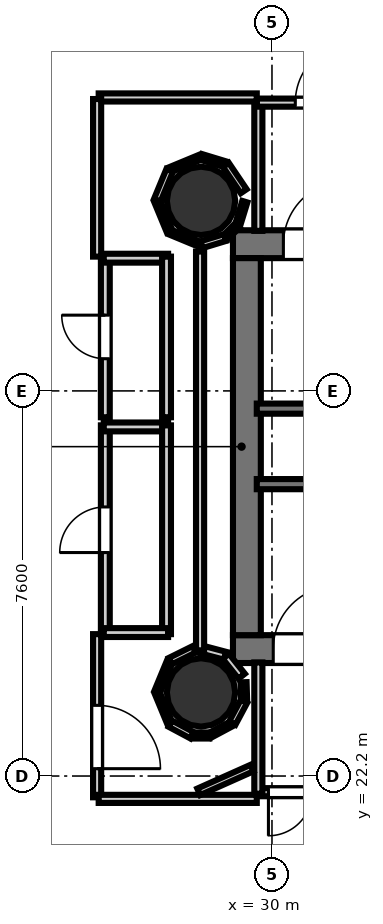
"""IFC4 building model, lengths in metres.
Left out: names, types, materials, properties, quantities, classifications, styles, units other than length and angle.
Written with IfcOpenShell. Run it as: python <this file> out.ifc"""

import sys

from ifc_helpers import new_model, si_unit, direction, frame, frame_2d, origin, origin_2d, place, context, subcontext, project, spatial, rectangle, hollow_circle, extrude, element, fill, save


model = new_model("IFC4")
c1 = context("Model", 3, precision=1e-05, world=origin(), true_north=direction((0.0, 1.0)))
c2 = subcontext(c1, "Body", "Model", "MODEL_VIEW")
j1 = project(units=[si_unit("LENGTHUNIT", "METRE"), si_unit("PLANEANGLEUNIT", "RADIAN")], contexts=[c1])
p1 = place(None, origin())
s1 = spatial("IfcSite", under=j1, at=p1, CompositionType="ELEMENT")
p2 = place(p1, origin())
s2 = spatial("IfcBuilding", under=s1, at=p2, CompositionType="ELEMENT")
p3 = place(p2, frame((0.0, 0.0, 173.5)))
s3 = spatial("IfcBuildingStorey", under=s2, at=p3, CompositionType="ELEMENT", Elevation=173.5)
p4 = place(p3, frame((29.23, 32.695, 0.0), z_axis=(0.0, 0.0, 1.0), x_axis=(1.0, 0.0, 0.0)))
e1 = element("IfcWall", 1, at=p4, inside=s3, PredefinedType="SHEAR", context=c2, shape_type="SweptSolid", body=[
    extrude(rectangle(XDim=10.62, YDim=0.55, at=frame_2d((5.31, 0.0))), origin(), (0.0, 0.0, 1.0), 3.52),
])
p5 = place(p4, frame((0.995, 0.0, 0.0)))
e2 = element("IfcOpeningElement", 2, at=p5, cuts=e1, PredefinedType="OPENING", context=c2, shape_type="SweptSolid", body=[
    extrude(rectangle(XDim=1.25, YDim=2.15, at=frame_2d((0.625, 1.075))), frame((0.0, 0.285, 0.0), z_axis=(0.0, -1.0, 0.0), x_axis=(1.0, 0.0, 0.0)), (0.0, 0.0, 1.0), 0.57),
])
p6 = place(p3, frame((29.23, 24.705, 0.0), z_axis=(0.0, 0.0, 1.0), x_axis=(1.0, 0.0, 0.0)))
e3 = element("IfcWall", 3, at=p6, inside=s3, PredefinedType="SHEAR", context=c2, shape_type="SweptSolid", body=[
    extrude(rectangle(XDim=10.62, YDim=0.55, at=frame_2d((5.31, 0.0))), origin(), (0.0, 0.0, 1.0), 3.52),
])
p7 = place(p6, frame((0.795, 0.0, 0.0)))
e4 = element("IfcOpeningElement", 4, at=p7, cuts=e3, PredefinedType="OPENING", context=c2, shape_type="SweptSolid", body=[
    extrude(rectangle(XDim=1.25, YDim=2.15, at=frame_2d((0.625, 1.075))), frame((0.0, 0.285, 0.0), z_axis=(0.0, -1.0, 0.0), x_axis=(1.0, 0.0, 0.0)), (0.0, 0.0, 1.0), 0.57),
])
p8 = place(p3, frame((29.505, 24.98, 0.0), z_axis=(0.0, 0.0, 1.0), x_axis=(0.0, 1.0, 0.0)))
e5 = element("IfcWall", 5, at=p8, inside=s3, PredefinedType="SHEAR", context=c2, shape_type="SweptSolid", body=[
    extrude(rectangle(XDim=7.44, YDim=0.55, at=frame_2d((3.72, 0.0))), origin(), (0.0, 0.0, 1.0), 3.52),
])
for number, where, z_axis, x_axis in (
    (6, (28.6, 33.55, 0.0), (0.0, 0.0, 1.0), (1.0, 0.0, 0.0)),
    (7, (28.6, 23.85, 0.0), (0.0, 0.0, 1.0), (1.0, 0.0, 0.0)),
):
    element("IfcColumn", number, at=place(p3, frame(where, z_axis=z_axis, x_axis=x_axis)), inside=s3, PredefinedType="COLUMN", context=c2, shape_type="SweptSolid", body=[
        extrude(hollow_circle(Radius=0.675, WallThickness=0.032, at=origin_2d()), origin(), (0.0, 0.0, 1.0), 3.7),
    ])
p9 = place(p3, frame((29.7, 29.45, 0.0), z_axis=(0.0, 0.0, 1.0), x_axis=(1.0, 0.0, 0.0)))
e8 = element("IfcWall", 8, at=p9, inside=s3, PredefinedType="SOLIDWALL", context=c2, shape_type="SweptSolid", body=[
    extrude(rectangle(XDim=8.3, YDim=0.2, at=frame_2d((4.15, 0.0))), origin(), (0.0, 0.0, 1.0), 3.52),
])
p10 = place(p3, frame((29.7, 27.96, 0.0), z_axis=(0.0, 0.0, 1.0), x_axis=(1.0, 0.0, 0.0)))
e9 = element("IfcWall", 9, at=p10, inside=s3, PredefinedType="SOLIDWALL", context=c2, shape_type="SweptSolid", body=[
    extrude(rectangle(XDim=7.75, YDim=0.2, at=frame_2d((3.875, 0.0))), origin(), (0.0, 0.0, 1.0), 3.52),
])
p11 = place(p3, frame((29.731, 32.958, 0.0), z_axis=(0.0, 0.0, 1.0), x_axis=(0.0, 1.0, 0.0)))
e10 = element("IfcWall", 10, at=p11, inside=s3, PredefinedType="PARTITIONING", context=c2, shape_type="SweptSolid", body=[
    extrude(rectangle(XDim=2.562, YDim=0.16, at=frame_2d((1.281, 0.0))), origin(), (0.0, 0.0, 1.0), 2.84),
])
p12 = place(p3, frame((29.7, 35.489, 0.0), z_axis=(0.0, 0.0, 1.0), x_axis=(1.0, 0.0, 0.0)))
e11 = element("IfcWall", 11, at=p12, inside=s3, PredefinedType="PARTITIONING", context=c2, shape_type="SweptSolid", body=[
    extrude(rectangle(XDim=2.72, YDim=0.16, at=frame_2d((1.36, 0.0))), origin(), (0.0, 0.0, 1.0), 2.84),
])
p13 = place(p12, frame((0.76, 0.0, 0.0)))
e12 = element("IfcOpeningElement", 12, at=p13, cuts=e11, PredefinedType="OPENING", context=c2, shape_type="SweptSolid", body=[
    extrude(rectangle(XDim=1.2, YDim=2.15, at=frame_2d((0.6, 1.075))), frame((0.0, 0.09, 0.0), z_axis=(0.0, -1.0, 0.0), x_axis=(1.0, 0.0, 0.0)), (0.0, 0.0, 1.0), 0.18),
])
p14 = place(p3, frame((33.45, 21.881, 0.0), z_axis=(0.0, 0.0, 1.0), x_axis=(-1.0, 0.0, 0.0)))
e13 = element("IfcWall", 13, at=p14, inside=s3, PredefinedType="PARTITIONING", context=c2, shape_type="SweptSolid", body=[
    extrude(rectangle(XDim=3.75, YDim=0.16, at=frame_2d((1.875, 0.0))), origin(), (0.0, 0.0, 1.0), 2.84),
])
p15 = place(p14, frame((1.275, 0.0, 0.0)))
e14 = element("IfcOpeningElement", 14, at=p15, cuts=e13, PredefinedType="OPENING", context=c2, shape_type="SweptSolid", body=[
    extrude(rectangle(XDim=1.2, YDim=2.15, at=frame_2d((0.6, 1.075))), frame((0.0, 0.09, 0.0), z_axis=(0.0, -1.0, 0.0), x_axis=(1.0, 0.0, 0.0)), (0.0, 0.0, 1.0), 0.18),
])
p16 = place(p14, frame((2.66, 0.0, 0.0)))
e15 = element("IfcOpeningElement", 15, at=p16, cuts=e13, PredefinedType="OPENING", context=c2, shape_type="SweptSolid", body=[
    extrude(rectangle(XDim=0.86, YDim=2.05, at=frame_2d((0.43, 1.025))), frame((0.0, 0.09, 0.0), z_axis=(0.0, -1.0, 0.0), x_axis=(1.0, 0.0, 0.0)), (0.0, 0.0, 1.0), 0.18),
])
p17 = place(p3, frame((29.731, 21.85, 0.0), z_axis=(0.0, 0.0, 1.0), x_axis=(0.0, 1.0, 0.0)))
e16 = element("IfcWall", 16, at=p17, inside=s3, PredefinedType="PARTITIONING", context=c2, shape_type="SweptSolid", body=[
    extrude(rectangle(XDim=2.592, YDim=0.16, at=frame_2d((1.296, 0.0))), origin(), (0.0, 0.0, 1.0), 2.84),
])
p18 = place(p3, frame((26.711, 25.0, 0.0), z_axis=(0.0, 0.0, 1.0), x_axis=(0.0, 1.0, 0.0)))
e17 = element("IfcWall", 17, at=p18, inside=s3, PredefinedType="PLUMBINGWALL", context=c2, shape_type="SweptSolid", body=[
    extrude(rectangle(XDim=4.12, YDim=0.175, at=frame_2d((2.06, 0.0))), origin(), (0.0, 0.0, 1.0), 2.84),
])
p19 = place(p18, frame((1.61, 0.0, 0.0)))
e18 = element("IfcOpeningElement", 18, at=p19, cuts=e17, PredefinedType="OPENING", context=c2, shape_type="SweptSolid", body=[
    extrude(rectangle(XDim=0.9, YDim=2.1, at=frame_2d((0.45, 1.05))), frame((0.0, 0.097, 0.0), z_axis=(0.0, -1.0, 0.0), x_axis=(1.0, 0.0, 0.0)), (0.0, 0.0, 1.0), 0.195),
])
p20 = place(p3, frame((26.68, 29.089, 0.0), z_axis=(0.0, 0.0, 1.0), x_axis=(1.0, 0.0, 0.0)))
e19 = element("IfcWall", 19, at=p20, inside=s3, PredefinedType="PLUMBINGWALL", context=c2, shape_type="SweptSolid", body=[
    extrude(rectangle(XDim=1.27, YDim=0.175, at=frame_2d((0.635, 0.0))), origin(), (0.0, 0.0, 1.0), 2.84),
])
p21 = place(p3, frame((27.919, 29.12, 0.0), z_axis=(0.0, 0.0, 1.0), x_axis=(0.0, -1.0, 0.0)))
e20 = element("IfcWall", 20, at=p21, inside=s3, PredefinedType="PLUMBINGWALL", context=c2, shape_type="SweptSolid", body=[
    extrude(rectangle(XDim=4.12, YDim=0.175, at=frame_2d((2.06, 0.0))), origin(), (0.0, 0.0, 1.0), 2.84),
])
p22 = place(p3, frame((27.95, 25.031, 0.0), z_axis=(0.0, 0.0, 1.0), x_axis=(-1.0, 0.0, 0.0)))
e21 = element("IfcWall", 21, at=p22, inside=s3, PredefinedType="PLUMBINGWALL", context=c2, shape_type="SweptSolid", body=[
    extrude(rectangle(XDim=1.27, YDim=0.175, at=frame_2d((0.635, 0.0))), origin(), (0.0, 0.0, 1.0), 2.84),
])
p23 = place(p3, frame((26.711, 29.28, 0.0), z_axis=(0.0, 0.0, 1.0), x_axis=(0.0, 1.0, 0.0)))
e22 = element("IfcWall", 22, at=p23, inside=s3, PredefinedType="PLUMBINGWALL", context=c2, shape_type="SweptSolid", body=[
    extrude(rectangle(XDim=3.17, YDim=0.175, at=frame_2d((1.585, 0.0))), origin(), (0.0, 0.0, 1.0), 2.84),
])
p24 = place(p23, frame((1.155, 0.0, 0.0)))
e23 = element("IfcOpeningElement", 23, at=p24, cuts=e22, PredefinedType="OPENING", context=c2, shape_type="SweptSolid", body=[
    extrude(rectangle(XDim=0.86, YDim=2.05, at=frame_2d((0.43, 1.025))), frame((0.0, 0.097, 0.0), z_axis=(0.0, -1.0, 0.0), x_axis=(1.0, 0.0, 0.0)), (0.0, 0.0, 1.0), 0.195),
])
p25 = place(p3, frame((26.68, 32.419, 0.0), z_axis=(0.0, 0.0, 1.0), x_axis=(1.0, 0.0, 0.0)))
e24 = element("IfcWall", 24, at=p25, inside=s3, PredefinedType="PLUMBINGWALL", context=c2, shape_type="SweptSolid", body=[
    extrude(rectangle(XDim=1.27, YDim=0.175, at=frame_2d((0.635, 0.0))), origin(), (0.0, 0.0, 1.0), 2.84),
])
p26 = place(p3, frame((27.919, 32.45, 0.0), z_axis=(0.0, 0.0, 1.0), x_axis=(0.0, -1.0, 0.0)))
e25 = element("IfcWall", 25, at=p26, inside=s3, PredefinedType="PLUMBINGWALL", context=c2, shape_type="SweptSolid", body=[
    extrude(rectangle(XDim=3.17, YDim=0.175, at=frame_2d((1.585, 0.0))), origin(), (0.0, 0.0, 1.0), 2.84),
])
p27 = place(p3, frame((29.402, 24.169, 0.0), z_axis=(0.0, 0.0, 1.0), x_axis=(-0.622091855036, 0.782944266151, 0.0)))
e26 = element("IfcWall", 26, at=p27, inside=s3, PredefinedType="PARTITIONING", context=c2, shape_type="SweptSolid", body=[
    extrude(rectangle(XDim=0.504, YDim=0.16, at=frame_2d((0.252, 0.0))), origin(), (0.0, 0.0, 1.0), 2.84),
])
p28 = place(p3, frame((29.072, 24.574, 0.0), z_axis=(0.0, 0.0, 1.0), x_axis=(-0.966842101769, 0.255374920942, 0.0)))
e27 = element("IfcWall", 27, at=p28, inside=s3, PredefinedType="PARTITIONING", context=c2, shape_type="SweptSolid", body=[
    extrude(rectangle(XDim=0.531, YDim=0.16, at=frame_2d((0.266, 0.0))), origin(), (0.0, 0.0, 1.0), 2.84),
])
p29 = place(p3, frame((28.581, 24.68, 0.0), z_axis=(0.0, 0.0, 1.0), x_axis=(0.0, 1.0, 0.0)))
e28 = element("IfcWall", 28, at=p29, inside=s3, PredefinedType="PARTITIONING", context=c2, shape_type="SweptSolid", body=[
    extrude(rectangle(XDim=7.87, YDim=0.16, at=frame_2d((3.935, 0.0))), origin(), (0.0, 0.0, 1.0), 2.84),
])
p30 = place(p3, frame((29.7, 35.591, 0.0), z_axis=(0.0, 0.0, 1.0), x_axis=(-1.0, 0.0, 0.0)))
e29 = element("IfcWall", 29, at=p30, inside=s3, PredefinedType="PARTITIONING", context=c2, shape_type="SweptSolid", body=[
    extrude(rectangle(XDim=3.12, YDim=0.16, at=frame_2d((1.56, 0.0))), origin(), (0.0, 0.0, 1.0), 2.84),
])
p31 = place(p3, frame((26.549, 35.56, 0.0), z_axis=(0.0, 0.0, 1.0), x_axis=(0.0, -1.0, 0.0)))
e30 = element("IfcWall", 30, at=p31, inside=s3, PredefinedType="PARTITIONING", context=c2, shape_type="SweptSolid", body=[
    extrude(rectangle(XDim=3.11, YDim=0.16, at=frame_2d((1.555, 0.0))), origin(), (0.0, 0.0, 1.0), 2.84),
])
p32 = place(p3, frame((26.549, 25.0, 0.0), z_axis=(0.0, 0.0, 1.0), x_axis=(0.0, -1.0, 0.0)))
e31 = element("IfcWall", 31, at=p32, inside=s3, PredefinedType="PARTITIONING", context=c2, shape_type="SweptSolid", body=[
    extrude(rectangle(XDim=3.22, YDim=0.16, at=frame_2d((1.61, 0.0))), origin(), (0.0, 0.0, 1.0), 2.84),
])
p33 = place(p32, frame((1.405, 0.0, 0.0)))
e32 = element("IfcOpeningElement", 32, at=p33, cuts=e31, PredefinedType="OPENING", context=c2, shape_type="SweptSolid", body=[
    extrude(rectangle(XDim=1.25, YDim=2.2, at=frame_2d((0.625, 1.1))), frame((0.0, 0.09, 0.0), z_axis=(0.0, -1.0, 0.0), x_axis=(1.0, 0.0, 0.0)), (0.0, 0.0, 1.0), 0.18),
])
p34 = place(p3, frame((26.58, 21.749, 0.0), z_axis=(0.0, 0.0, 1.0), x_axis=(1.0, 0.0, 0.0)))
e33 = element("IfcWall", 33, at=p34, inside=s3, PredefinedType="PARTITIONING", context=c2, shape_type="SweptSolid", body=[
    extrude(rectangle(XDim=3.12, YDim=0.16, at=frame_2d((1.56, 0.0))), origin(), (0.0, 0.0, 1.0), 2.84),
])
p35 = place(p3, frame((28.466, 24.701, 0.0), z_axis=(0.0, 0.0, 1.0), x_axis=(-0.896097594631, -0.4438570726, 0.0)))
e34 = element("IfcWall", 34, at=p35, inside=s3, PredefinedType="PARTITIONING", context=c2, shape_type="SweptSolid", body=[
    extrude(rectangle(XDim=0.524, YDim=0.14, at=frame_2d((0.262, 0.0))), origin(), (0.0, 0.0, 1.0), 2.84),
])
p36 = place(p3, frame((27.981, 24.452, 0.0), z_axis=(0.0, 0.0, 1.0), x_axis=(-0.38268910224, -0.923877183952, 0.0)))
e35 = element("IfcWall", 35, at=p36, inside=s3, PredefinedType="PARTITIONING", context=c2, shape_type="SweptSolid", body=[
    extrude(rectangle(XDim=0.639, YDim=0.12, at=frame_2d((0.32, 0.0))), origin(), (0.0, 0.0, 1.0), 2.84),
])
p37 = place(p3, frame((27.736, 23.838, 0.0), z_axis=(0.0, 0.0, 1.0), x_axis=(0.382824178437, -0.923821221018, 0.0)))
e36 = element("IfcWall", 36, at=p37, inside=s3, PredefinedType="PARTITIONING", context=c2, shape_type="SweptSolid", body=[
    extrude(rectangle(XDim=0.639, YDim=0.105, at=frame_2d((0.319, 0.0))), origin(), (0.0, 0.0, 1.0), 2.84),
])
p38 = place(p3, frame((27.995, 23.232, 0.0), z_axis=(0.0, 0.0, 1.0), x_axis=(0.88190639713, -0.471424550379, 0.0)))
e37 = element("IfcWall", 37, at=p38, inside=s3, PredefinedType="PARTITIONING", context=c2, shape_type="SweptSolid", body=[
    extrude(rectangle(XDim=0.485, YDim=0.14, at=frame_2d((0.242, 0.0))), origin(), (0.0, 0.0, 1.0), 2.84),
])
p39 = place(p3, frame((28.437, 23.0, 0.0), z_axis=(0.0, 0.0, 1.0), x_axis=(1.0, 0.0, 0.0)))
e38 = element("IfcWall", 38, at=p39, inside=s3, PredefinedType="PARTITIONING", context=c2, shape_type="SweptSolid", body=[
    extrude(rectangle(XDim=0.326, YDim=0.12, at=frame_2d((0.163, 0.0))), origin(), (0.0, 0.0, 1.0), 2.84),
])
p40 = place(p3, frame((28.778, 23.004, 0.0), z_axis=(0.0, 0.0, 1.0), x_axis=(0.88190639713, 0.471424550379, 0.0)))
e39 = element("IfcWall", 39, at=p40, inside=s3, PredefinedType="PARTITIONING", context=c2, shape_type="SweptSolid", body=[
    extrude(rectangle(XDim=0.485, YDim=0.105, at=frame_2d((0.242, 0.0))), origin(), (0.0, 0.0, 1.0), 2.84),
])
p41 = place(p3, frame((29.218, 23.245, 0.0), z_axis=(0.0, 0.0, 1.0), x_axis=(0.471424550379, 0.88190639713, 0.0)))
e40 = element("IfcWall", 40, at=p41, inside=s3, PredefinedType="PARTITIONING", context=c2, shape_type="SweptSolid", body=[
    extrude(rectangle(XDim=0.485, YDim=0.14, at=frame_2d((0.242, 0.0))), origin(), (0.0, 0.0, 1.0), 2.84),
])
p42 = place(p3, frame((29.45, 23.688, 0.0), z_axis=(0.0, 0.0, 1.0), x_axis=(-0.030919976938, 0.999521863206, 0.0)))
e41 = element("IfcWall", 41, at=p42, inside=s3, PredefinedType="PARTITIONING", context=c2, shape_type="SweptSolid", body=[
    extrude(rectangle(XDim=0.363, YDim=0.12, at=frame_2d((0.182, 0.0))), origin(), (0.0, 0.0, 1.0), 2.84),
])
p43 = place(p3, frame((29.607, 22.358, 0.0), z_axis=(0.0, 0.0, 1.0), x_axis=(-0.913023814965, -0.407906255538, 0.0)))
e42 = element("IfcWall", 42, at=p43, inside=s3, PredefinedType="PARTITIONING", context=c2, shape_type="SweptSolid", body=[
    extrude(rectangle(XDim=1.153, YDim=0.14, at=frame_2d((0.576, 0.0))), origin(), (0.0, 0.0, 1.0), 2.84),
])
p44 = place(p3, frame((29.441, 33.741, 0.0), z_axis=(0.0, 0.0, 1.0), x_axis=(-0.559619584068, 0.828749613048, 0.0)))
e43 = element("IfcWall", 43, at=p44, inside=s3, PredefinedType="PARTITIONING", context=c2, shape_type="SweptSolid", body=[
    extrude(rectangle(XDim=0.629, YDim=0.14, at=frame_2d((0.314, 0.0))), origin(), (0.0, 0.0, 1.0), 2.84),
])
p45 = place(p3, frame((29.073, 34.274, 0.0), z_axis=(0.0, 0.0, 1.0), x_axis=(-0.956893067978, 0.290440452511, 0.0)))
e44 = element("IfcWall", 44, at=p45, inside=s3, PredefinedType="PARTITIONING", context=c2, shape_type="SweptSolid", body=[
    extrude(rectangle(XDim=0.485, YDim=0.12, at=frame_2d((0.243, 0.0))), origin(), (0.0, 0.0, 1.0), 2.84),
])
p46 = place(p3, frame((28.588, 34.414, 0.0), z_axis=(0.0, 0.0, 1.0), x_axis=(-0.923956302996, -0.382498039412, 0.0)))
e45 = element("IfcWall", 45, at=p46, inside=s3, PredefinedType="PARTITIONING", context=c2, shape_type="SweptSolid", body=[
    extrude(rectangle(XDim=0.639, YDim=0.105, at=frame_2d((0.319, 0.0))), origin(), (0.0, 0.0, 1.0), 2.84),
])
p47 = place(p3, frame((27.981, 34.152, 0.0), z_axis=(0.0, 0.0, 1.0), x_axis=(-0.382824178437, -0.923821221018, 0.0)))
e46 = element("IfcWall", 46, at=p47, inside=s3, PredefinedType="PARTITIONING", context=c2, shape_type="SweptSolid", body=[
    extrude(rectangle(XDim=0.639, YDim=0.14, at=frame_2d((0.319, 0.0))), origin(), (0.0, 0.0, 1.0), 2.84),
])
p48 = place(p3, frame((27.736, 33.538, 0.0), z_axis=(0.0, 0.0, 1.0), x_axis=(0.382824178437, -0.923821221018, 0.0)))
e47 = element("IfcWall", 47, at=p48, inside=s3, PredefinedType="PARTITIONING", context=c2, shape_type="SweptSolid", body=[
    extrude(rectangle(XDim=0.639, YDim=0.12, at=frame_2d((0.319, 0.0))), origin(), (0.0, 0.0, 1.0), 2.84),
])
p49 = place(p3, frame((27.998, 32.931, 0.0), z_axis=(0.0, 0.0, 1.0), x_axis=(0.923821221018, -0.382824178437, 0.0)))
e48 = element("IfcWall", 48, at=p49, inside=s3, PredefinedType="PARTITIONING", context=c2, shape_type="SweptSolid", body=[
    extrude(rectangle(XDim=0.639, YDim=0.105, at=frame_2d((0.319, 0.0))), origin(), (0.0, 0.0, 1.0), 2.84),
])
p50 = place(p3, frame((28.609, 32.685, 0.0), z_axis=(0.0, 0.0, 1.0), x_axis=(0.956893067978, 0.290440452511, 0.0)))
e49 = element("IfcWall", 49, at=p50, inside=s3, PredefinedType="PARTITIONING", context=c2, shape_type="SweptSolid", body=[
    extrude(rectangle(XDim=0.485, YDim=0.14, at=frame_2d((0.243, 0.0))), origin(), (0.0, 0.0, 1.0), 2.84),
])
p51 = place(p3, frame((29.086, 32.834, 0.0), z_axis=(0.0, 0.0, 1.0), x_axis=(0.707106781187, 0.707106781187, 0.0)))
e50 = element("IfcWall", 50, at=p51, inside=s3, PredefinedType="PARTITIONING", context=c2, shape_type="SweptSolid", body=[
    extrude(rectangle(XDim=0.326, YDim=0.12, at=frame_2d((0.163, 0.0))), origin(), (0.0, 0.0, 1.0), 2.84),
])
p52 = place(p3, frame((29.324, 33.077, 0.0), z_axis=(0.0, 0.0, 1.0), x_axis=(0.292866596221, 0.956153312402, 0.0)))
e51 = element("IfcWall", 51, at=p52, inside=s3, PredefinedType="PARTITIONING", context=c2, shape_type="SweptSolid", body=[
    extrude(rectangle(XDim=0.479, YDim=0.105, at=frame_2d((0.239, 0.0))), origin(), (0.0, 0.0, 1.0), 2.84),
])
p53 = place(p5, origin())
e52 = element("IfcDoor", 52, at=p53, inside=s3, OperationType="SINGLE_SWING_RIGHT", PredefinedType="DOOR", context=c2, shape_type="SweptSolid", body=[
    extrude(rectangle(XDim=1.25, YDim=2.15, at=frame_2d((0.625, 1.075))), frame((0.0, 0.025, 0.0), z_axis=(0.0, -1.0, 0.0), x_axis=(1.0, 0.0, 0.0)), (0.0, 0.0, 1.0), 0.05),
])
fill(e2, e52)
p54 = place(p7, origin())
e53 = element("IfcDoor", 53, at=p54, inside=s3, OperationType="SINGLE_SWING_RIGHT", PredefinedType="DOOR", context=c2, shape_type="SweptSolid", body=[
    extrude(rectangle(XDim=1.25, YDim=2.15, at=frame_2d((0.625, 1.075))), frame((0.0, 0.025, 0.0), z_axis=(0.0, -1.0, 0.0), x_axis=(1.0, 0.0, 0.0)), (0.0, 0.0, 1.0), 0.05),
])
fill(e4, e53)
p55 = place(p13, origin())
e54 = element("IfcDoor", 54, at=p55, inside=s3, OperationType="SINGLE_SWING_RIGHT", PredefinedType="DOOR", context=c2, shape_type="SweptSolid", body=[
    extrude(rectangle(XDim=1.2, YDim=2.15, at=frame_2d((0.6, 1.075))), frame((0.0, 0.025, 0.0), z_axis=(0.0, -1.0, 0.0), x_axis=(1.0, 0.0, 0.0)), (0.0, 0.0, 1.0), 0.05),
])
fill(e12, e54)
p56 = place(p19, origin())
e55 = element("IfcDoor", 55, at=p56, inside=s3, OperationType="SINGLE_SWING_LEFT", PredefinedType="DOOR", context=c2, shape_type="SweptSolid", body=[
    extrude(rectangle(XDim=0.9, YDim=2.1, at=frame_2d((0.45, 1.05))), frame((0.0, 0.025, 0.0), z_axis=(0.0, -1.0, 0.0), x_axis=(1.0, 0.0, 0.0)), (0.0, 0.0, 1.0), 0.05),
])
fill(e18, e55)
p57 = place(p24, origin())
e56 = element("IfcDoor", 56, at=p57, inside=s3, OperationType="SINGLE_SWING_RIGHT", PredefinedType="DOOR", context=c2, shape_type="SweptSolid", body=[
    extrude(rectangle(XDim=0.86, YDim=2.05, at=frame_2d((0.43, 1.025))), frame((0.0, 0.025, 0.0), z_axis=(0.0, -1.0, 0.0), x_axis=(1.0, 0.0, 0.0)), (0.0, 0.0, 1.0), 0.05),
])
fill(e23, e56)
p58 = place(p16, origin())
e57 = element("IfcDoor", 57, at=p58, inside=s3, OperationType="SINGLE_SWING_RIGHT", PredefinedType="DOOR", context=c2, shape_type="SweptSolid", body=[
    extrude(rectangle(XDim=0.86, YDim=2.05, at=frame_2d((0.43, 1.025))), frame((0.0, 0.025, 0.0), z_axis=(0.0, -1.0, 0.0), x_axis=(1.0, 0.0, 0.0)), (0.0, 0.0, 1.0), 0.05),
])
fill(e15, e57)
p59 = place(p33, origin())
e58 = element("IfcDoor", 58, at=p59, inside=s3, OperationType="SINGLE_SWING_RIGHT", PredefinedType="DOOR", context=c2, shape_type="SweptSolid", body=[
    extrude(rectangle(XDim=1.25, YDim=2.2, at=frame_2d((0.625, 1.1))), frame((0.0, 0.025, 0.0), z_axis=(0.0, -1.0, 0.0), x_axis=(1.0, 0.0, 0.0)), (0.0, 0.0, 1.0), 0.05),
])
fill(e32, e58)
save(model, sys.argv[1])
